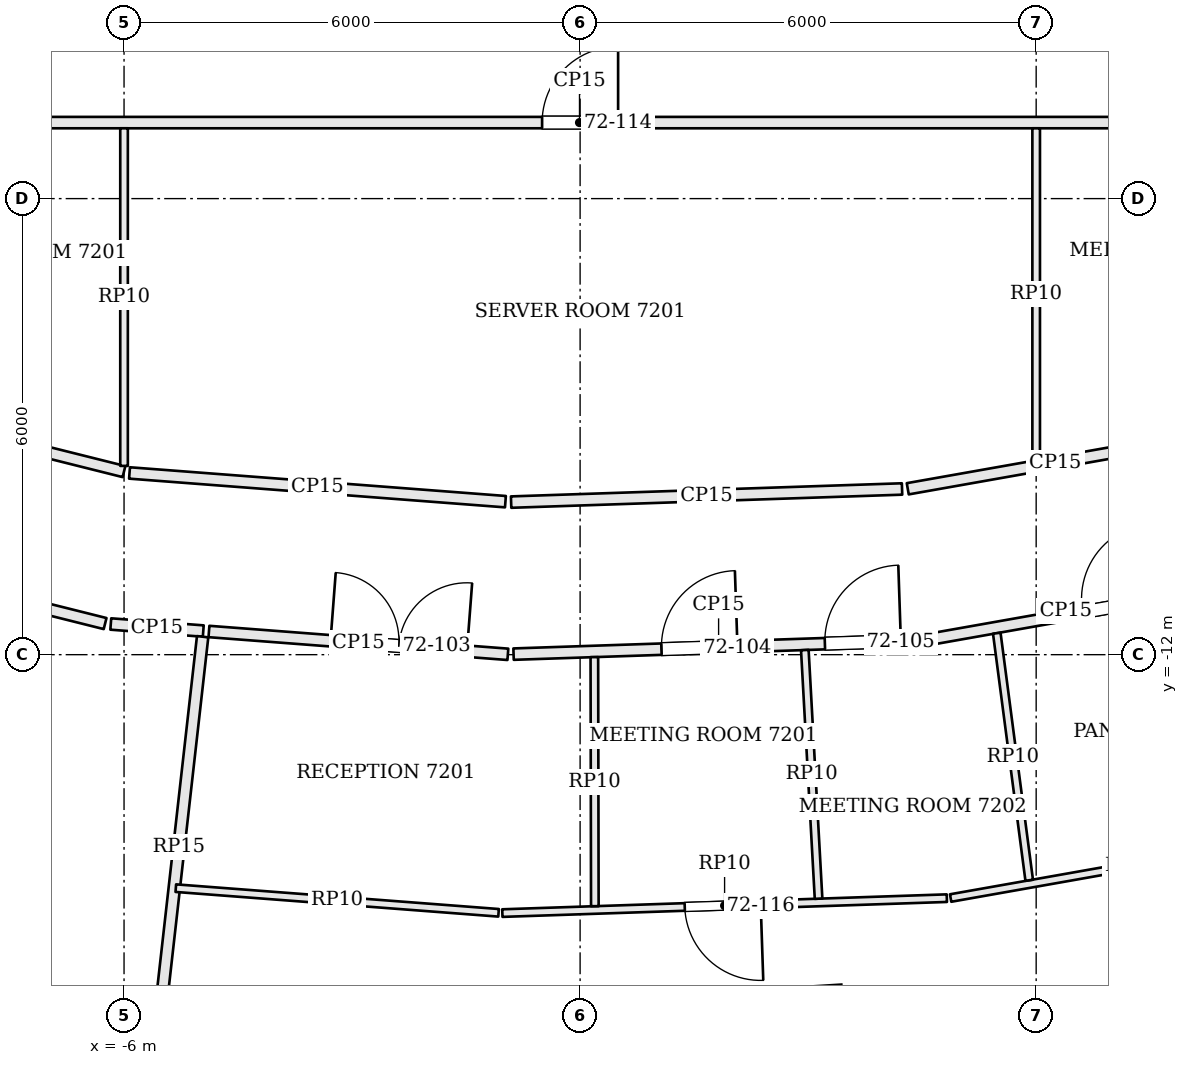
"""IFC4 building model, lengths in metres.
Left out: names, types, materials, properties, quantities, classifications, styles, units other than length and angle.
Written with IfcOpenShell. Run it as: python <this file> out.ifc"""

import sys

from ifc_helpers import new_model, si_unit, direction, frame, frame_2d, origin, place, context, subcontext, project, spatial, rectangle, extrude, element, fill, save


model = new_model("IFC4")
c1 = context("Model", 3, precision=1e-05, world=origin(), true_north=direction((0.0, 1.0)))
c2 = subcontext(c1, "Body", "Model", "MODEL_VIEW")
j1 = project(units=[si_unit("LENGTHUNIT", "METRE"), si_unit("PLANEANGLEUNIT", "RADIAN")], contexts=[c1])
p1 = place(None, origin())
s1 = spatial("IfcSite", under=j1, at=p1, CompositionType="ELEMENT")
p2 = place(p1, origin())
s2 = spatial("IfcBuilding", under=s1, at=p2, CompositionType="ELEMENT")
p3 = place(p2, frame((0.0, 0.0, 292.2)))
s3 = spatial("IfcBuildingStorey", under=s2, at=p3, CompositionType="ELEMENT", Elevation=292.2)
p4 = place(p3, frame((-10.333, -10.569, 0.0), z_axis=(0.0, 0.0, 1.0), x_axis=(0.970067398009, -0.242835836151, 0.0)))
e1 = element("IfcWall", 1, at=p4, inside=s3, PredefinedType="PARTITIONING", context=c2, shape_type="SweptSolid", body=[
    extrude(rectangle(XDim=4.209, YDim=0.15, at=frame_2d((2.105, 0.0))), origin(), (0.0, 0.0, 1.0), 3.198),
])
p5 = place(p3, frame((-6.175, -11.596, 0.0), z_axis=(0.0, 0.0, 1.0), x_axis=(0.997106038867, -0.076023333621, 0.0)))
e2 = element("IfcWall", 2, at=p5, inside=s3, PredefinedType="PARTITIONING", context=c2, shape_type="SweptSolid", body=[
    extrude(rectangle(XDim=1.22, YDim=0.15, at=frame_2d((0.61, 0.0))), origin(), (0.0, 0.0, 1.0), 3.198),
])
p6 = place(p3, frame((-5.59, -17.294, 0.0), z_axis=(0.0, 0.0, 1.0), x_axis=(0.112044411854, 0.993703200041, 0.0)))
e3 = element("IfcWall", 3, at=p6, inside=s3, PredefinedType="PARTITIONING", context=c2, shape_type="SweptSolid", body=[
    extrude(rectangle(XDim=5.565, YDim=0.15, at=frame_2d((2.783, 0.0))), origin(), (0.0, 0.0, 1.0), 3.234),
])
p7 = place(p3, frame((-4.883, -11.695, 0.0), z_axis=(0.0, 0.0, 1.0), x_axis=(0.997096936577, -0.076142623207, 0.0)))
e4 = element("IfcWall", 4, at=p7, inside=s3, PredefinedType="PARTITIONING", context=c2, shape_type="SweptSolid", body=[
    extrude(rectangle(XDim=3.944, YDim=0.15, at=frame_2d((1.972, 0.0))), origin(), (0.0, 0.0, 1.0), 3.198),
])
p8 = place(p7, frame((1.604, 0.0, 0.0)))
e5 = element("IfcOpeningElement", 5, at=p8, cuts=e4, PredefinedType="OPENING", context=c2, shape_type="SweptSolid", body=[
    extrude(rectangle(XDim=1.8, YDim=2.1, at=frame_2d((0.9, 1.05))), frame((0.0, 0.085, 0.0), z_axis=(0.0, -1.0, 0.0), x_axis=(1.0, 0.0, 0.0)), (0.0, 0.0, 1.0), 0.17),
])
p9 = place(p3, frame((-0.875, -11.993, 0.0), z_axis=(0.0, 0.0, 1.0), x_axis=(0.999436745295, 0.033558786542, 0.0)))
e6 = element("IfcWall", 6, at=p9, inside=s3, PredefinedType="PARTITIONING", context=c2, shape_type="SweptSolid", body=[
    extrude(rectangle(XDim=5.398, YDim=0.15, at=frame_2d((2.699, 0.0))), origin(), (0.0, 0.0, 1.0), 3.198),
])
p10 = place(p9, frame((1.947, 0.0, 0.0)))
e7 = element("IfcOpeningElement", 7, at=p10, cuts=e6, PredefinedType="OPENING", context=c2, shape_type="SweptSolid", body=[
    extrude(rectangle(XDim=1.0, YDim=2.4, at=frame_2d((0.5, 1.2))), frame((0.0, 0.085, 0.0), z_axis=(0.0, -1.0, 0.0), x_axis=(1.0, 0.0, 0.0)), (0.0, 0.0, 1.0), 0.17),
])
p11 = place(p9, frame((4.098, 0.0, 0.0)))
e8 = element("IfcOpeningElement", 8, at=p11, cuts=e6, PredefinedType="OPENING", context=c2, shape_type="SweptSolid", body=[
    extrude(rectangle(XDim=1.0, YDim=2.4, at=frame_2d((0.5, 1.2))), frame((0.0, 0.085, 0.0), z_axis=(0.0, -1.0, 0.0), x_axis=(1.0, 0.0, 0.0)), (0.0, 0.0, 1.0), 0.17),
])
p12 = place(p3, frame((4.594, -11.799, 0.0), z_axis=(0.0, 0.0, 1.0), x_axis=(0.984693444773, 0.174295208833, 0.0)))
e9 = element("IfcWall", 9, at=p12, inside=s3, PredefinedType="PARTITIONING", context=c2, shape_type="SweptSolid", body=[
    extrude(rectangle(XDim=4.261, YDim=0.15, at=frame_2d((2.13, 0.0))), origin(), (0.0, 0.0, 1.0), 3.198),
])
p13 = place(p12, frame((2.05, 0.0, 0.0)))
e10 = element("IfcOpeningElement", 10, at=p13, cuts=e9, PredefinedType="OPENING", context=c2, shape_type="SweptSolid", body=[
    extrude(rectangle(XDim=1.0, YDim=2.1, at=frame_2d((0.5, 1.05))), frame((0.0, 0.085, 0.0), z_axis=(0.0, -1.0, 0.0), x_axis=(1.0, 0.0, 0.0)), (0.0, 0.0, 1.0), 0.17),
])
p14 = place(p3, frame((8.195, -9.13, 0.0), z_axis=(0.0, 0.0, 1.0), x_axis=(-0.9846880937, -0.174325437403, 0.0)))
e11 = element("IfcWall", 11, at=p14, inside=s3, PredefinedType="PARTITIONING", context=c2, shape_type="SweptSolid", body=[
    extrude(rectangle(XDim=3.945, YDim=0.15, at=frame_2d((1.973, 0.0))), origin(), (0.0, 0.0, 1.0), 3.198),
])
p15 = place(p3, frame((4.236, -9.82, 0.0), z_axis=(0.0, 0.0, 1.0), x_axis=(-0.999435760561, -0.033588100749, 0.0)))
e12 = element("IfcWall", 12, at=p15, inside=s3, PredefinedType="PARTITIONING", context=c2, shape_type="SweptSolid", body=[
    extrude(rectangle(XDim=5.146, YDim=0.15, at=frame_2d((2.573, 0.0))), origin(), (0.0, 0.0, 1.0), 3.198),
])
p16 = place(p3, frame((-0.982, -9.987, 0.0), z_axis=(0.0, 0.0, 1.0), x_axis=(-0.997096607341, 0.07614693447, 0.0)))
e13 = element("IfcWall", 13, at=p16, inside=s3, PredefinedType="PARTITIONING", context=c2, shape_type="SweptSolid", body=[
    extrude(rectangle(XDim=4.96, YDim=0.15, at=frame_2d((2.48, 0.0))), origin(), (0.0, 0.0, 1.0), 3.198),
])
p17 = place(p3, frame((-6.001, -9.591, 0.0), z_axis=(0.0, 0.0, 1.0), x_axis=(-0.970063855769, 0.242849986061, 0.0)))
e14 = element("IfcWall", 14, at=p17, inside=s3, PredefinedType="PARTITIONING", context=c2, shape_type="SweptSolid", body=[
    extrude(rectangle(XDim=3.837, YDim=0.15, at=frame_2d((1.919, 0.0))), origin(), (0.0, 0.0, 1.0), 3.198),
])
p18 = place(p3, frame((-14.789, -5.0, 0.0), z_axis=(0.0, 0.0, 1.0), x_axis=(1.0, 0.0, 0.0)))
e15 = element("IfcWall", 15, at=p18, inside=s3, PredefinedType="PARTITIONING", context=c2, shape_type="SweptSolid", body=[
    extrude(rectangle(XDim=29.562, YDim=0.15, at=frame_2d((14.781, 0.0))), origin(), (0.0, 0.0, 1.0), 3.198),
])
p19 = place(p18, frame((3.857, 0.0, 0.0)))
e16 = element("IfcOpeningElement", 16, at=p19, cuts=e15, PredefinedType="OPENING", context=c2, shape_type="SweptSolid", body=[
    extrude(rectangle(XDim=1.0, YDim=2.4, at=frame_2d((0.5, 1.2))), frame((0.0, 0.085, 0.0), z_axis=(0.0, -1.0, 0.0), x_axis=(1.0, 0.0, 0.0)), (0.0, 0.0, 1.0), 0.17),
])
p20 = place(p18, frame((14.289, 0.0, 0.0)))
e17 = element("IfcOpeningElement", 17, at=p20, cuts=e15, PredefinedType="OPENING", context=c2, shape_type="SweptSolid", body=[
    extrude(rectangle(XDim=1.0, YDim=2.1, at=frame_2d((0.5, 1.05))), frame((0.0, 0.085, 0.0), z_axis=(0.0, -1.0, 0.0), x_axis=(1.0, 0.0, 0.0)), (0.0, 0.0, 1.0), 0.17),
])
p21 = place(p18, frame((24.713, 0.0, 0.0)))
e18 = element("IfcOpeningElement", 18, at=p21, cuts=e15, PredefinedType="OPENING", context=c2, shape_type="SweptSolid", body=[
    extrude(rectangle(XDim=1.0, YDim=2.4, at=frame_2d((0.5, 1.2))), frame((0.0, 0.085, 0.0), z_axis=(0.0, -1.0, 0.0), x_axis=(1.0, 0.0, 0.0)), (0.0, 0.0, 1.0), 0.17),
])
p22 = place(p3, frame((9.625, -14.361, 0.0), z_axis=(0.0, 0.0, 1.0), x_axis=(-0.984691710098, -0.174305008716, 0.0)))
e19 = element("IfcWall", 19, at=p22, inside=s3, PredefinedType="PARTITIONING", context=c2, shape_type="SweptSolid", body=[
    extrude(rectangle(XDim=4.824, YDim=0.1, at=frame_2d((2.412, 0.0))), origin(), (0.0, 0.0, 1.0), 3.198),
])
p23 = place(p3, frame((4.825, -15.203, 0.0), z_axis=(0.0, 0.0, 1.0), x_axis=(-0.999435699456, -0.033589918924, 0.0)))
e20 = element("IfcWall", 20, at=p23, inside=s3, PredefinedType="PARTITIONING", context=c2, shape_type="SweptSolid", body=[
    extrude(rectangle(XDim=5.851, YDim=0.1, at=frame_2d((2.926, 0.0))), origin(), (0.0, 0.0, 1.0), 3.198),
])
p24 = place(p23, frame((2.45, 0.0, 0.0)))
e21 = element("IfcOpeningElement", 21, at=p24, cuts=e20, PredefinedType="OPENING", context=c2, shape_type="SweptSolid", body=[
    extrude(rectangle(XDim=1.0, YDim=2.4, at=frame_2d((0.5, 1.2))), frame((0.0, 0.06, 0.0), z_axis=(0.0, -1.0, 0.0), x_axis=(1.0, 0.0, 0.0)), (0.0, 0.0, 1.0), 0.12),
])
p25 = place(p3, frame((-1.073, -15.396, 0.0), z_axis=(0.0, 0.0, 1.0), x_axis=(-0.997093140471, 0.076192317369, 0.0)))
e22 = element("IfcWall", 22, at=p25, inside=s3, PredefinedType="PARTITIONING", context=c2, shape_type="SweptSolid", body=[
    extrude(rectangle(XDim=4.259, YDim=0.1, at=frame_2d((2.129, 0.0))), origin(), (0.0, 0.0, 1.0), 3.198),
])
p26 = place(p3, frame((0.188, -12.032, 0.0), z_axis=(0.0, 0.0, 1.0), x_axis=(0.001937258864, -0.999998123512, 0.0)))
e23 = element("IfcWall", 23, at=p26, inside=s3, PredefinedType="PARTITIONING", context=c2, shape_type="SweptSolid", body=[
    extrude(rectangle(XDim=3.277, YDim=0.1, at=frame_2d((1.638, 0.0))), origin(), (0.0, 0.0, 1.0), 3.198),
])
p27 = place(p3, frame((2.956, -11.939, 0.0), z_axis=(0.0, 0.0, 1.0), x_axis=(0.055226477976, -0.998473853504, 0.0)))
e24 = element("IfcWall", 24, at=p27, inside=s3, PredefinedType="PARTITIONING", context=c2, shape_type="SweptSolid", body=[
    extrude(rectangle(XDim=3.276, YDim=0.1, at=frame_2d((1.638, 0.0))), origin(), (0.0, 0.0, 1.0), 3.198),
])
p28 = place(p3, frame((5.482, -11.718, 0.0), z_axis=(0.0, 0.0, 1.0), x_axis=(0.130173255727, -0.991491262439, 0.0)))
e25 = element("IfcWall", 25, at=p28, inside=s3, PredefinedType="PARTITIONING", context=c2, shape_type="SweptSolid", body=[
    extrude(rectangle(XDim=3.278, YDim=0.1, at=frame_2d((1.639, 0.0))), origin(), (0.0, 0.0, 1.0), 3.198),
])
p29 = place(p3, frame((-6.0, -9.516, 0.0), z_axis=(0.0, 0.0, 1.0), x_axis=(0.0, 1.0, 0.0)))
e26 = element("IfcWall", 26, at=p29, inside=s3, PredefinedType="PARTITIONING", context=c2, shape_type="SweptSolid", body=[
    extrude(rectangle(XDim=4.441, YDim=0.1, at=frame_2d((2.221, 0.0))), origin(), (0.0, 0.0, 1.0), 3.198),
])
p30 = place(p3, frame((6.0, -9.444, 0.0), z_axis=(0.0, 0.0, 1.0), x_axis=(0.0, 1.0, 0.0)))
e27 = element("IfcWall", 27, at=p30, inside=s3, PredefinedType="PARTITIONING", context=c2, shape_type="SweptSolid", body=[
    extrude(rectangle(XDim=4.369, YDim=0.1, at=frame_2d((2.184, 0.0))), origin(), (0.0, 0.0, 1.0), 3.198),
])
p31 = place(p8, origin())
e28 = element("IfcDoor", 28, at=p31, inside=s3, OperationType="DOUBLE_DOOR_SINGLE_SWING", PredefinedType="DOOR", context=c2, shape_type="SweptSolid", body=[
    extrude(rectangle(XDim=1.8, YDim=2.1, at=frame_2d((0.9, 1.05))), frame((0.0, 0.025, 0.0), z_axis=(0.0, -1.0, 0.0), x_axis=(1.0, 0.0, 0.0)), (0.0, 0.0, 1.0), 0.05),
])
fill(e5, e28)
p32 = place(p10, origin())
e29 = element("IfcDoor", 29, at=p32, inside=s3, OperationType="SINGLE_SWING_RIGHT", PredefinedType="DOOR", context=c2, shape_type="SweptSolid", body=[
    extrude(rectangle(XDim=1.0, YDim=2.4, at=frame_2d((0.5, 1.2))), frame((0.0, 0.025, 0.0), z_axis=(0.0, -1.0, 0.0), x_axis=(1.0, 0.0, 0.0)), (0.0, 0.0, 1.0), 0.05),
])
fill(e7, e29)
p33 = place(p11, origin())
e30 = element("IfcDoor", 30, at=p33, inside=s3, OperationType="SINGLE_SWING_RIGHT", PredefinedType="DOOR", context=c2, shape_type="SweptSolid", body=[
    extrude(rectangle(XDim=1.0, YDim=2.4, at=frame_2d((0.5, 1.2))), frame((0.0, 0.025, 0.0), z_axis=(0.0, -1.0, 0.0), x_axis=(1.0, 0.0, 0.0)), (0.0, 0.0, 1.0), 0.05),
])
fill(e8, e30)
p34 = place(p20, origin())
e31 = element("IfcDoor", 31, at=p34, inside=s3, OperationType="SINGLE_SWING_RIGHT", PredefinedType="DOOR", context=c2, shape_type="SweptSolid", body=[
    extrude(rectangle(XDim=1.0, YDim=2.1, at=frame_2d((0.5, 1.05))), frame((0.0, 0.025, 0.0), z_axis=(0.0, -1.0, 0.0), x_axis=(1.0, 0.0, 0.0)), (0.0, 0.0, 1.0), 0.05),
])
fill(e17, e31)
p35 = place(p24, origin())
e32 = element("IfcDoor", 32, at=p35, inside=s3, OperationType="SINGLE_SWING_LEFT", PredefinedType="DOOR", context=c2, shape_type="SweptSolid", body=[
    extrude(rectangle(XDim=1.0, YDim=2.4, at=frame_2d((0.5, 1.2))), frame((0.0, 0.025, 0.0), z_axis=(0.0, -1.0, 0.0), x_axis=(1.0, 0.0, 0.0)), (0.0, 0.0, 1.0), 0.05),
])
fill(e21, e32)
p36 = place(p13, origin())
e33 = element("IfcDoor", 33, at=p36, inside=s3, OperationType="SINGLE_SWING_RIGHT", PredefinedType="DOOR", context=c2, shape_type="SweptSolid", body=[
    extrude(rectangle(XDim=1.0, YDim=2.1, at=frame_2d((0.5, 1.05))), frame((0.0, 0.025, 0.0), z_axis=(0.0, -1.0, 0.0), x_axis=(1.0, 0.0, 0.0)), (0.0, 0.0, 1.0), 0.05),
])
fill(e10, e33)
save(model, sys.argv[1])
